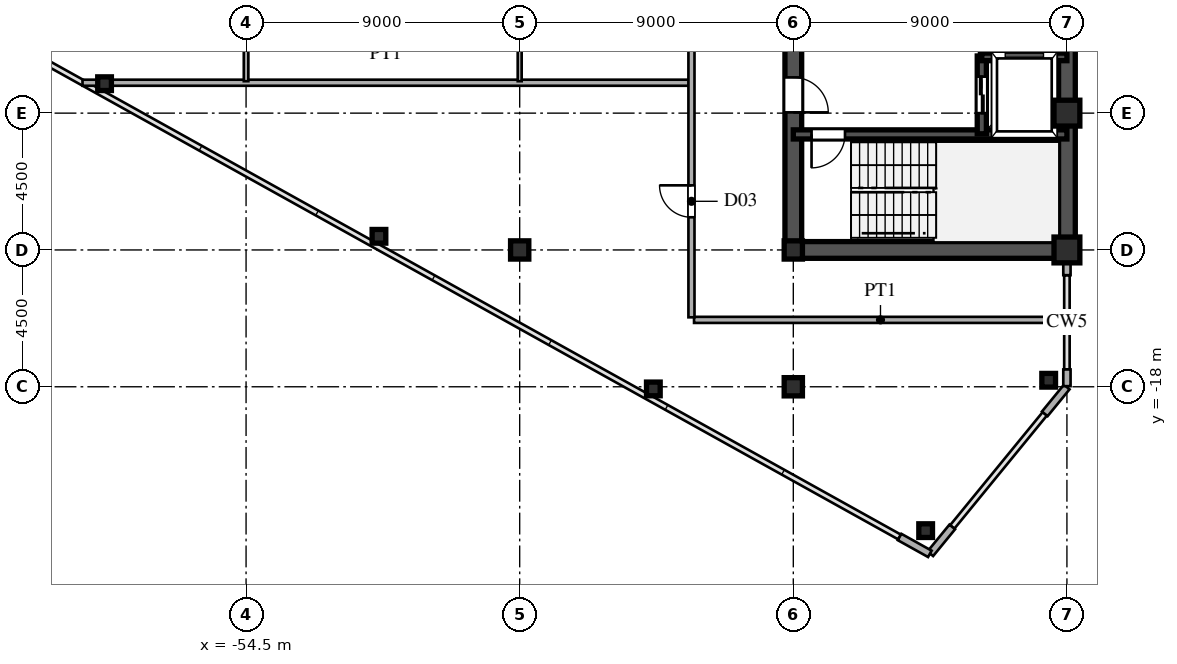
"""IFC4 building model, lengths in metres.
Left out: names, types, materials, properties, quantities, classifications, styles, units other than length and angle.
Written with IfcOpenShell. Run it as: python <this file> out.ifc"""

import sys

from ifc_helpers import new_model, si_unit, direction, frame, frame_2d, origin, origin_2d, place, context, subcontext, project, spatial, rectangle, hollow_rectangle, i_section, extrude, source, transform, mapped, element, fill, save


model = new_model("IFC4")
c1 = context("Model", 3, precision=1e-05, world=origin(), true_north=direction((0.0, 1.0)))
c2 = subcontext(c1, "Body", "Model", "MODEL_VIEW")
j1 = project(units=[si_unit("LENGTHUNIT", "METRE"), si_unit("PLANEANGLEUNIT", "RADIAN")], contexts=[c1])
p1 = place(None, origin())
s1 = spatial("IfcSite", under=j1, at=p1, CompositionType="ELEMENT")
p2 = place(p1, origin())
s2 = spatial("IfcBuilding", under=s1, at=p2, CompositionType="ELEMENT")
p3 = place(p2, frame((0.0, 0.0, 170.7)))
s3 = spatial("IfcBuildingStorey", under=s2, at=p3, CompositionType="ELEMENT", Elevation=170.7)
m1 = source(origin(), c2, "Body", "SweptSolid", [
    extrude(hollow_rectangle(XDim=0.85, YDim=0.85, WallThickness=0.036, at=origin_2d()), origin(), (0.0, 0.0, 1.0), 3.6),
])
for number, where, z_axis, x_axis in (
    (1, (-27.5, -13.5, 0.0), (0.0, 0.0, 1.0), (1.0, 0.0, 0.0)),
    (2, (-27.5, -9.0, 0.0), (0.0, 0.0, 1.0), (1.0, 0.0, 0.0)),
):
    element("IfcColumn", number, at=place(p3, frame(where, z_axis=z_axis, x_axis=x_axis)), inside=s3, PredefinedType="COLUMN", context=c2, shape_type="MappedRepresentation", body=[
        mapped(m1, transform((0.0, 0.0, 0.0), scale=1.0)),
    ])
m2 = source(origin(), c2, "Body", "SweptSolid", [
    extrude(i_section(OverallWidth=0.6, OverallDepth=0.6, WebThickness=0.025, FlangeThickness=0.04, at=origin_2d()), origin(), (0.0, 0.0, 1.0), 3.6),
])
for number, where, z_axis, x_axis in (
    (3, (-36.5, -18.0, 0.0), (0.0, 0.0, 1.0), (1.0, 0.0, 0.0)),
    (4, (-36.5, -13.5, 0.0), (0.0, 0.0, 1.0), (1.0, 0.0, 0.0)),
    (5, (-45.5, -13.5, 0.0), (0.0, 0.0, 1.0), (1.0, 0.0, 0.0)),
):
    element("IfcColumn", number, at=place(p3, frame(where, z_axis=z_axis, x_axis=x_axis)), inside=s3, PredefinedType="COLUMN", context=c2, shape_type="MappedRepresentation", body=[
        mapped(m2, transform((0.0, 0.0, 0.0), scale=1.0)),
    ])
m3 = source(origin(), c2, "Body", "SweptSolid", [
    extrude(hollow_rectangle(XDim=0.45, YDim=0.45, WallThickness=0.018, at=origin_2d()), origin(), (0.0, 0.0, 1.0), 3.6),
])
for number, where, z_axis, x_axis in (
    (6, (-28.1, -17.786, 0.0), (0.0, 0.0, 1.0), (1.0, 0.0, 0.0)),
    (7, (-32.147, -22.732, 0.0), (0.0, 0.0, 1.0), (1.0, 0.0, 0.0)),
    (8, (-41.104, -18.071, 0.0), (0.0, 0.0, 1.0), (1.0, 0.0, 0.0)),
    (9, (-50.129, -13.051, 0.0), (0.0, 0.0, 1.0), (1.0, 0.0, 0.0)),
    (10, (-59.155, -8.031, 0.0), (0.0, 0.0, 1.0), (1.0, 0.0, 0.0)),
):
    element("IfcColumn", number, at=place(p3, frame(where, z_axis=z_axis, x_axis=x_axis)), inside=s3, PredefinedType="COLUMN", context=c2, shape_type="MappedRepresentation", body=[
        mapped(m3, transform((0.0, 0.0, 0.0), scale=1.0)),
    ])
p4 = place(p3, frame((-27.5, -17.98, 0.0), z_axis=(0.0, 0.0, 1.0), x_axis=(0.0, 1.0, 0.0)))
e11 = element("IfcWall", 11, at=p4, inside=s3, PredefinedType="SOLIDWALL", context=c2, shape_type="SweptSolid", body=[
    extrude(rectangle(XDim=0.55, YDim=0.24, at=frame_2d((0.275, 0.0))), origin(), (0.0, 0.0, 1.0), 3.38),
])
p5 = place(p3, frame((-27.5, -14.33, 0.0), z_axis=(0.0, 0.0, 1.0), x_axis=(0.0, 1.0, 0.0)))
e12 = element("IfcWall", 12, at=p5, inside=s3, PredefinedType="SOLIDWALL", context=c2, shape_type="SweptSolid", body=[
    extrude(rectangle(XDim=0.55, YDim=0.24, at=frame_2d((0.275, 0.0))), origin(), (0.0, 0.0, 1.0), 2.88),
])
p6 = place(p3, frame((-33.005, -22.941, 0.0), z_axis=(0.0, 0.0, 1.0), x_axis=(0.87385402111, -0.486188389196, 0.0)))
e13 = element("IfcWall", 13, at=p6, inside=s3, PredefinedType="SOLIDWALL", context=c2, shape_type="SweptSolid", body=[
    extrude(rectangle(XDim=1.14, YDim=0.24, at=frame_2d((0.57, 0.0))), origin(), (0.0, 0.0, 1.0), 3.38),
])
for number, where, z_axis, x_axis in (
    (14, (-31.994, -23.492, 0.0), (0.0, 0.0, 1.0), (0.633, 0.774, 0.0)),
    (15, (-28.228, -18.89, 0.0), (0.0, 0.0, 1.0), (0.633, 0.774, 0.0)),
):
    element("IfcWall", number, at=place(p3, frame(where, z_axis=z_axis, x_axis=x_axis)), inside=s3, PredefinedType="SOLIDWALL", context=c2, shape_type="SweptSolid", body=[
        extrude(rectangle(XDim=1.14, YDim=0.24, at=frame_2d((0.57, 0.0))), origin(), (0.0, 0.0, 1.0), 3.38),
    ])
p7 = place(p3, frame((-27.5, -13.5, 0.0), z_axis=(0.0, 0.0, 1.0), x_axis=(0.0, 1.0, 0.0)))
e16 = element("IfcWall", 16, at=p7, inside=s3, PredefinedType="SHEAR", context=c2, shape_type="SweptSolid", body=[
    extrude(rectangle(XDim=12.2, YDim=0.55, at=frame_2d((6.1, 0.0))), origin(), (0.0, 0.0, 1.0), 3.38),
])
p8 = place(p3, frame((-36.5, -13.5, 0.0), z_axis=(0.0, 0.0, 1.0), x_axis=(1.0, 0.0, 0.0)))
e17 = element("IfcWall", 17, at=p8, inside=s3, PredefinedType="SHEAR", context=c2, shape_type="SweptSolid", body=[
    extrude(rectangle(XDim=9.0, YDim=0.55, at=frame_2d((4.5, 0.0))), origin(), (0.0, 0.0, 1.0), 3.38),
])
p9 = place(p3, frame((-36.5, -13.65, 0.0), z_axis=(0.0, 0.0, 1.0), x_axis=(0.0, 1.0, 0.0)))
e18 = element("IfcWall", 18, at=p9, inside=s3, PredefinedType="SHEAR", context=c2, shape_type="SweptSolid", body=[
    extrude(rectangle(XDim=7.15, YDim=0.55, at=frame_2d((3.575, 0.0))), origin(), (0.0, 0.0, 1.0), 3.38),
])
p10 = place(p9, frame((4.675, 0.0, 0.0)))
e19 = element("IfcOpeningElement", 19, at=p10, cuts=e18, PredefinedType="OPENING", context=c2, shape_type="SweptSolid", body=[
    extrude(rectangle(XDim=1.15, YDim=2.2, at=frame_2d((0.575, 1.1))), frame((0.0, 0.285, 0.0), z_axis=(0.0, -1.0, 0.0), x_axis=(1.0, 0.0, 0.0)), (0.0, 0.0, 1.0), 0.57),
])
p11 = place(p3, frame((-36.5, -9.7, 0.0), z_axis=(0.0, 0.0, 1.0), x_axis=(1.0, 0.0, 0.0)))
e20 = element("IfcWall", 20, at=p11, inside=s3, PredefinedType="SHEAR", context=c2, shape_type="SweptSolid", body=[
    extrude(rectangle(XDim=9.0, YDim=0.3, at=frame_2d((4.5, 0.0))), origin(), (0.0, 0.0, 1.0), 3.38),
])
p12 = place(p11, frame((0.6, 0.0, 0.0)))
e21 = element("IfcOpeningElement", 21, at=p12, cuts=e20, PredefinedType="OPENING", context=c2, shape_type="SweptSolid", body=[
    extrude(rectangle(XDim=1.1, YDim=2.2, at=frame_2d((0.55, 1.1))), frame((0.0, 0.16, 0.0), z_axis=(0.0, -1.0, 0.0), x_axis=(1.0, 0.0, 0.0)), (0.0, 0.0, 1.0), 0.32),
])
p13 = place(p3, frame((-30.3, -7.15, 0.0), z_axis=(0.0, 0.0, 1.0), x_axis=(1.0, 0.0, 0.0)))
e22 = element("IfcWall", 22, at=p13, inside=s3, PredefinedType="SHEAR", context=c2, shape_type="SweptSolid", body=[
    extrude(rectangle(XDim=2.8, YDim=0.25, at=frame_2d((1.4, 0.0))), origin(), (0.0, 0.0, 1.0), 3.38),
])
p14 = place(p3, frame((-30.3, -9.68, 0.0), z_axis=(0.0, 0.0, 1.0), x_axis=(0.0, 1.0, 0.0)))
e23 = element("IfcWall", 23, at=p14, inside=s3, PredefinedType="SHEAR", context=c2, shape_type="SweptSolid", body=[
    extrude(rectangle(XDim=2.56, YDim=0.3, at=frame_2d((1.28, 0.0))), origin(), (0.0, 0.0, 1.0), 3.38),
])
p15 = place(p14, frame((0.68, 0.0, 0.0)))
e24 = element("IfcOpeningElement", 24, at=p15, cuts=e23, PredefinedType="OPENING", context=c2, shape_type="SweptSolid", body=[
    extrude(rectangle(XDim=1.2, YDim=2.25, at=frame_2d((0.6, 1.125))), frame((0.0, 0.16, 0.0), z_axis=(0.0, -1.0, 0.0), x_axis=(1.0, 0.0, 0.0)), (0.0, 0.0, 1.0), 0.32),
])
p16 = place(p3, frame((-30.3, -7.12, 0.0), z_axis=(0.0, 0.0, 1.0), x_axis=(0.0, 1.0, 0.0)))
e25 = element("IfcWall", 25, at=p16, inside=s3, PredefinedType="PARTITIONING", context=c2, shape_type="SweptSolid", body=[
    extrude(rectangle(XDim=0.62, YDim=0.18, at=frame_2d((0.31, 0.0))), origin(), (0.0, 0.0, 1.0), 3.38),
])
p17 = place(p3, frame((-39.765, -15.8, 0.0), z_axis=(0.0, 0.0, 1.0), x_axis=(1.0, 0.0, 0.0)))
e26 = element("IfcWall", 26, at=p17, inside=s3, PredefinedType="PARTITIONING", context=c2, shape_type="SweptSolid", body=[
    extrude(rectangle(XDim=12.265, YDim=0.2, at=frame_2d((6.132, 0.0))), origin(), (0.0, 0.0, 1.0), 3.38),
])
p18 = place(p3, frame((-59.88, -8.0, 0.0), z_axis=(0.0, 0.0, 1.0), x_axis=(1.0, 0.0, 0.0)))
e27 = element("IfcWall", 27, at=p18, inside=s3, PredefinedType="PARTITIONING", context=c2, shape_type="SweptSolid", body=[
    extrude(rectangle(XDim=19.95, YDim=0.2, at=frame_2d((9.975, 0.0))), origin(), (0.0, 0.0, 1.0), 3.38),
])
p19 = place(p3, frame((-54.5, -7.95, 0.0), z_axis=(0.0, 0.0, 1.0), x_axis=(0.0, 1.0, 0.0)))
e28 = element("IfcWall", 28, at=p19, inside=s3, PredefinedType="PARTITIONING", context=c2, shape_type="SweptSolid", body=[
    extrude(rectangle(XDim=13.9, YDim=0.15, at=frame_2d((6.95, 0.0))), origin(), (0.0, 0.0, 1.0), 2.78),
])
p20 = place(p19, frame((6.475, 0.0, 0.0)))
e29 = element("IfcOpeningElement", 29, at=p20, cuts=e28, PredefinedType="OPENING", context=c2, shape_type="SweptSolid", body=[
    extrude(rectangle(XDim=0.95, YDim=2.15, at=frame_2d((0.475, 1.075))), frame((0.0, 0.085, 0.0), z_axis=(0.0, -1.0, 0.0), x_axis=(1.0, 0.0, 0.0)), (0.0, 0.0, 1.0), 0.17),
])
p21 = place(p3, frame((-45.5, -7.95, 0.0), z_axis=(0.0, 0.0, 1.0), x_axis=(0.0, 1.0, 0.0)))
e30 = element("IfcWall", 30, at=p21, inside=s3, PredefinedType="PARTITIONING", context=c2, shape_type="SweptSolid", body=[
    extrude(rectangle(XDim=9.233, YDim=0.13, at=frame_2d((4.616, 0.0))), origin(), (0.0, 0.0, 1.0), 2.78),
])
p22 = place(p21, frame((6.475, 0.0, 0.0)))
e31 = element("IfcOpeningElement", 31, at=p22, cuts=e30, PredefinedType="OPENING", context=c2, shape_type="SweptSolid", body=[
    extrude(rectangle(XDim=0.95, YDim=2.15, at=frame_2d((0.475, 1.075))), frame((0.0, 0.075, 0.0), z_axis=(0.0, -1.0, 0.0), x_axis=(1.0, 0.0, 0.0)), (0.0, 0.0, 1.0), 0.15),
])
p23 = place(p3, frame((-39.85, -15.715, 0.0), z_axis=(0.0, 0.0, 1.0), x_axis=(0.0, 1.0, 0.0)))
e32 = element("IfcWall", 32, at=p23, inside=s3, PredefinedType="PARTITIONING", context=c2, shape_type="SweptSolid", body=[
    extrude(rectangle(XDim=31.43, YDim=0.2, at=frame_2d((15.715, 0.0))), origin(), (0.0, 0.0, 1.0), 3.38),
])
p24 = place(p23, frame((3.29, 0.0, 0.0)))
e33 = element("IfcOpeningElement", 33, at=p24, cuts=e32, PredefinedType="OPENING", context=c2, shape_type="SweptSolid", body=[
    extrude(rectangle(XDim=1.05, YDim=2.25, at=frame_2d((0.525, 1.125))), frame((0.0, 0.11, 0.0), z_axis=(0.0, -1.0, 0.0), x_axis=(1.0, 0.0, 0.0)), (0.0, 0.0, 1.0), 0.22),
])
p25 = place(p23, frame((13.98, 0.0, 0.0)))
e34 = element("IfcOpeningElement", 34, at=p25, cuts=e32, PredefinedType="OPENING", context=c2, shape_type="SweptSolid", body=[
    extrude(rectangle(XDim=1.05, YDim=2.25, at=frame_2d((0.525, 1.125))), frame((0.0, 0.11, 0.0), z_axis=(0.0, -1.0, 0.0), x_axis=(1.0, 0.0, 0.0)), (0.0, 0.0, 1.0), 0.22),
])
p26 = place(p23, frame((26.09, 0.0, 0.0)))
e35 = element("IfcOpeningElement", 35, at=p26, cuts=e32, PredefinedType="OPENING", context=c2, shape_type="SweptSolid", body=[
    extrude(rectangle(XDim=1.05, YDim=2.25, at=frame_2d((0.525, 1.125))), frame((0.0, 0.11, 0.0), z_axis=(0.0, -1.0, 0.0), x_axis=(1.0, 0.0, 0.0)), (0.0, 0.0, 1.0), 0.22),
])
m4 = source(origin(), c2, "Body", "SweptSolid", [
    extrude(rectangle(XDim=1.15, YDim=2.2, at=frame_2d((0.575, 1.1))), frame((0.0, 0.025, 0.0), z_axis=(0.0, -1.0, 0.0), x_axis=(1.0, 0.0, 0.0)), (0.0, 0.0, 1.0), 0.05),
])
p27 = place(p10, frame((1.15, 0.0, 0.0), z_axis=(0.0, 0.0, 1.0), x_axis=(-1.0, 0.0, 0.0)))
e36 = element("IfcDoor", 36, at=p27, inside=s3, OperationType="SINGLE_SWING_LEFT", PredefinedType="DOOR", context=c2, shape_type="MappedRepresentation", body=[
    mapped(m4, transform((0.0, 0.0, 0.0), scale=1.0)),
])
fill(e19, e36)
m5 = source(origin(), c2, "Body", "SweptSolid", [
    extrude(rectangle(XDim=1.1, YDim=2.2, at=frame_2d((0.55, 1.1))), frame((0.0, 0.025, 0.0), z_axis=(0.0, -1.0, 0.0), x_axis=(1.0, 0.0, 0.0)), (0.0, 0.0, 1.0), 0.05),
])
p28 = place(p12, frame((1.1, 0.0, 0.0), z_axis=(0.0, 0.0, 1.0), x_axis=(-1.0, 0.0, 0.0)))
e37 = element("IfcDoor", 37, at=p28, inside=s3, OperationType="SINGLE_SWING_LEFT", PredefinedType="DOOR", context=c2, shape_type="MappedRepresentation", body=[
    mapped(m5, transform((0.0, 0.0, 0.0), scale=1.0)),
])
fill(e21, e37)
m6 = source(origin(), c2, "Body", "SweptSolid", [
    extrude(rectangle(XDim=1.2, YDim=2.25, at=frame_2d((0.6, 1.125))), frame((0.0, 0.025, 0.0), z_axis=(0.0, -1.0, 0.0), x_axis=(1.0, 0.0, 0.0)), (0.0, 0.0, 1.0), 0.05),
])
p29 = place(p15, origin())
e38 = element("IfcDoor", 38, at=p29, inside=s3, OperationType="DOUBLE_DOOR_SLIDING", PredefinedType="DOOR", context=c2, shape_type="MappedRepresentation", body=[
    mapped(m6, transform((0.0, 0.0, 0.0), scale=1.0)),
])
fill(e24, e38)
m7 = source(origin(), c2, "Body", "SweptSolid", [
    extrude(rectangle(XDim=1.05, YDim=2.25, at=frame_2d((0.525, 1.125))), frame((0.0, 0.025, 0.0), z_axis=(0.0, -1.0, 0.0), x_axis=(1.0, 0.0, 0.0)), (0.0, 0.0, 1.0), 0.05),
])
p30 = place(p24, origin())
e39 = element("IfcDoor", 39, at=p30, inside=s3, OperationType="SINGLE_SWING_RIGHT", PredefinedType="DOOR", context=c2, shape_type="MappedRepresentation", body=[
    mapped(m7, transform((0.0, 0.0, 0.0), scale=1.0)),
])
fill(e33, e39)
save(model, sys.argv[1])
